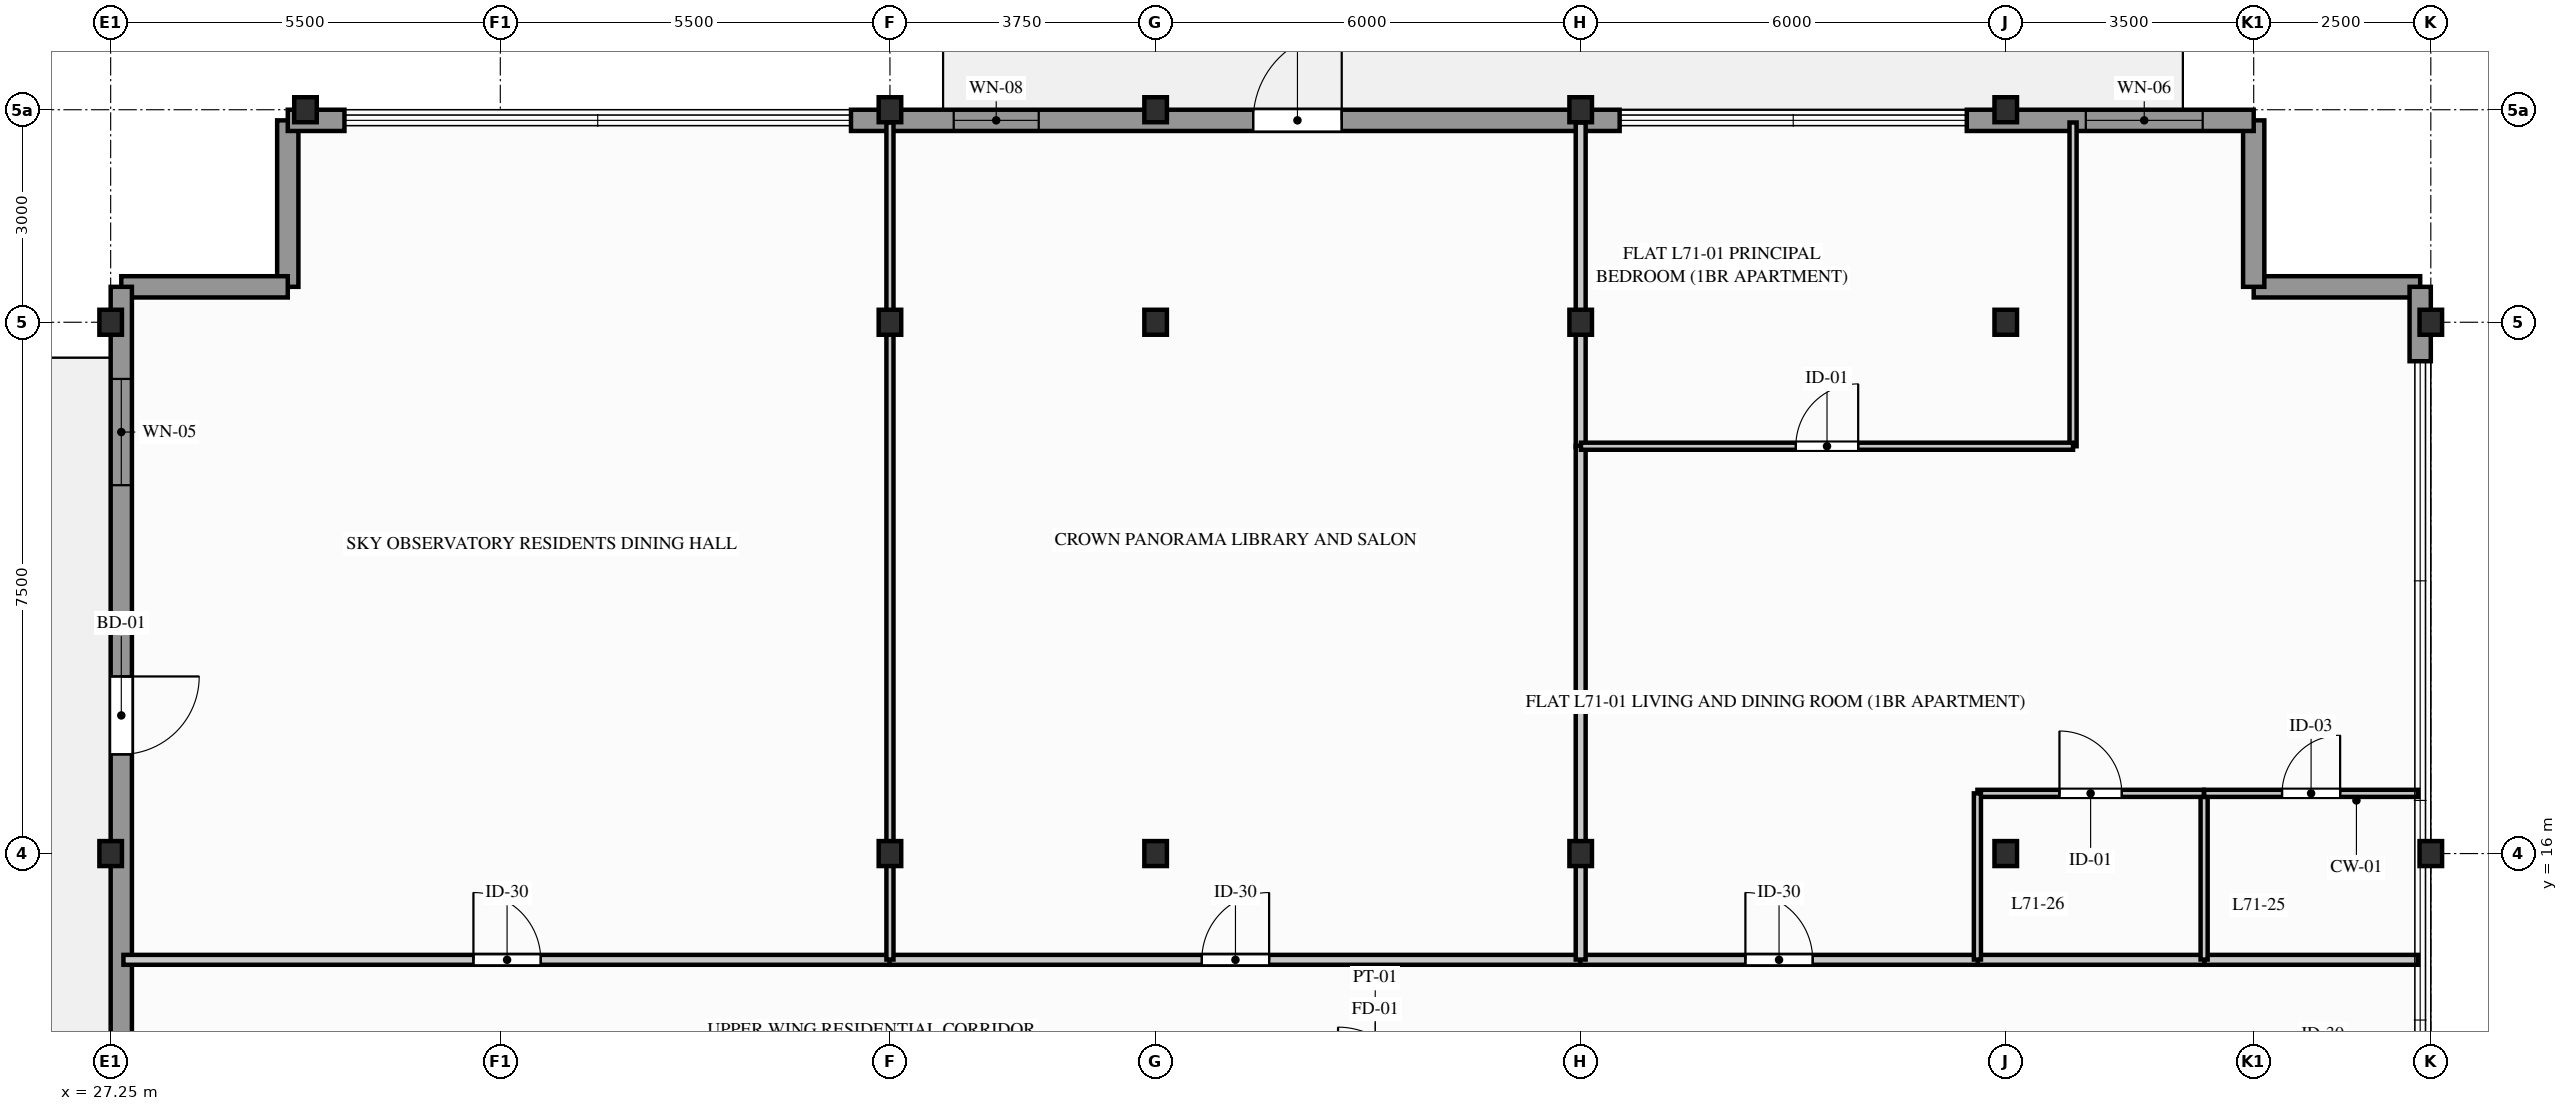
"""IFC4 building model, lengths in metres.
Left out: names, types, materials, properties, quantities, classifications, styles, units other than length and angle.
Written with IfcOpenShell. Run it as: python <this file> out.ifc"""

import sys

from ifc_helpers import new_model, si_unit, direction, frame, frame_2d, origin, origin_2d, place, context, subcontext, project, spatial, rectangle, i_section, extrude, element, fill, save


model = new_model("IFC4")
c1 = context("Model", 3, precision=1e-05, world=origin(), true_north=direction((0.0, 1.0)))
c2 = subcontext(c1, "Body", "Model", "MODEL_VIEW")
j1 = project(units=[si_unit("LENGTHUNIT", "METRE"), si_unit("PLANEANGLEUNIT", "RADIAN")], contexts=[c1])
p1 = place(None, origin())
s1 = spatial("IfcSite", under=j1, at=p1, CompositionType="ELEMENT")
p2 = place(p1, origin())
s2 = spatial("IfcBuilding", under=s1, at=p2, CompositionType="ELEMENT")
p3 = place(p2, frame((0.0, 0.0, 233.5)))
s3 = spatial("IfcBuildingStorey", under=s2, at=p3, CompositionType="ELEMENT", Elevation=233.5)
for number, where, z_axis, x_axis in (
    (1, (27.25, 16.0, 0.0), (0.0, 0.0, 1.0), (1.0, 0.0, 0.0)),
    (2, (27.25, 23.5, 0.0), (0.0, 0.0, 1.0), (1.0, 0.0, 0.0)),
    (3, (30.0, 26.5, 0.0), (0.0, 0.0, 1.0), (1.0, 0.0, 0.0)),
    (4, (38.25, 16.0, 0.0), (0.0, 0.0, 1.0), (1.0, 0.0, 0.0)),
    (5, (38.25, 23.5, 0.0), (0.0, 0.0, 1.0), (1.0, 0.0, 0.0)),
    (6, (38.25, 26.5, 0.0), (0.0, 0.0, 1.0), (1.0, 0.0, 0.0)),
    (7, (42.0, 16.0, 0.0), (0.0, 0.0, 1.0), (1.0, 0.0, 0.0)),
    (8, (42.0, 23.5, 0.0), (0.0, 0.0, 1.0), (1.0, 0.0, 0.0)),
    (9, (42.0, 26.5, 0.0), (0.0, 0.0, 1.0), (1.0, 0.0, 0.0)),
    (10, (48.0, 16.0, 0.0), (0.0, 0.0, 1.0), (1.0, 0.0, 0.0)),
    (11, (48.0, 23.5, 0.0), (0.0, 0.0, 1.0), (1.0, 0.0, 0.0)),
    (12, (48.0, 26.5, 0.0), (0.0, 0.0, 1.0), (1.0, 0.0, 0.0)),
    (13, (54.0, 16.0, 0.0), (0.0, 0.0, 1.0), (1.0, 0.0, 0.0)),
    (14, (54.0, 23.5, 0.0), (0.0, 0.0, 1.0), (1.0, 0.0, 0.0)),
    (15, (54.0, 26.5, 0.0), (0.0, 0.0, 1.0), (1.0, 0.0, 0.0)),
    (16, (60.0, 16.0, 0.0), (0.0, 0.0, 1.0), (1.0, 0.0, 0.0)),
    (17, (60.0, 23.5, 0.0), (0.0, 0.0, 1.0), (1.0, 0.0, 0.0)),
):
    element("IfcColumn", number, at=place(p3, frame(where, z_axis=z_axis, x_axis=x_axis)), inside=s3, PredefinedType="COLUMN", context=c2, shape_type="SweptSolid", body=[
        extrude(i_section(OverallWidth=0.318, OverallDepth=0.353, WebThickness=0.023, FlangeThickness=0.038, FilletRadius=0.015, at=origin_2d()), origin(), (0.0, 0.0, 1.0), 3.1),
    ])
for number, where, z_axis, x_axis in (
    (18, (59.85, 24.0, 0.0), (0.0, 0.0, 1.0), (-1.0, 0.0, 0.0)),
    (19, (57.5, 24.0, 0.0), (0.0, 0.0, 1.0), (0.0, 1.0, 0.0)),
    (20, (29.75, 26.35, 0.0), (0.0, 0.0, 1.0), (0.0, -1.0, 0.0)),
    (21, (29.75, 24.0, 0.0), (0.0, 0.0, 1.0), (-1.0, 0.0, 0.0)),
):
    element("IfcWall", number, at=place(p3, frame(where, z_axis=z_axis, x_axis=x_axis)), inside=s3, PredefinedType="STANDARD", context=c2, shape_type="SweptSolid", body=[
        extrude(rectangle(XDim=2.35, YDim=0.3, at=frame_2d((1.175, 0.0))), origin(), (0.0, 0.0, 1.0), 2.89),
    ])
p4 = place(p3, frame((59.85, 22.95, 0.0), z_axis=(0.0, 0.0, 1.0), x_axis=(0.0, 1.0, 0.0)))
e22 = element("IfcWall", 22, at=p4, inside=s3, PredefinedType="STANDARD", context=c2, shape_type="SweptSolid", body=[
    extrude(rectangle(XDim=1.05, YDim=0.3, at=frame_2d((0.525, 0.0))), origin(), (0.0, 0.0, 1.0), 2.89),
])
p5 = place(p3, frame((29.75, 26.35, 0.0), z_axis=(0.0, 0.0, 1.0), x_axis=(1.0, 0.0, 0.0)))
e23 = element("IfcWall", 23, at=p5, inside=s3, PredefinedType="STANDARD", context=c2, shape_type="SweptSolid", body=[
    extrude(rectangle(XDim=0.8, YDim=0.3, at=frame_2d((0.4, 0.0))), origin(), (0.0, 0.0, 1.0), 2.89),
])
p6 = place(p3, frame((37.7, 26.35, 0.0), z_axis=(0.0, 0.0, 1.0), x_axis=(1.0, 0.0, 0.0)))
e24 = element("IfcWall", 24, at=p6, inside=s3, PredefinedType="STANDARD", context=c2, shape_type="SweptSolid", body=[
    extrude(rectangle(XDim=10.85, YDim=0.3, at=frame_2d((5.425, 0.0))), origin(), (0.0, 0.0, 1.0), 2.332),
])
p7 = place(p6, frame((5.677, 0.0, 0.0)))
e25 = element("IfcOpeningElement", 25, at=p7, cuts=e24, PredefinedType="OPENING", context=c2, shape_type="SweptSolid", body=[
    extrude(rectangle(XDim=1.25, YDim=2.2, at=frame_2d((0.625, 1.1))), frame((0.0, 0.16, 0.0), z_axis=(0.0, -1.0, 0.0), x_axis=(1.0, 0.0, 0.0)), (0.0, 0.0, 1.0), 0.32),
])
p8 = place(p6, frame((1.45, 0.0, 0.512)))
e26 = element("IfcOpeningElement", 26, at=p8, cuts=e24, PredefinedType="OPENING", context=c2, shape_type="SweptSolid", body=[
    extrude(rectangle(XDim=1.2, YDim=1.6, at=frame_2d((0.6, 0.8))), frame((0.0, 0.16, 0.0), z_axis=(0.0, -1.0, 0.0), x_axis=(1.0, 0.0, 0.0)), (0.0, 0.0, 1.0), 0.32),
])
p9 = place(p3, frame((53.45, 26.35, 0.0), z_axis=(0.0, 0.0, 1.0), x_axis=(1.0, 0.0, 0.0)))
e27 = element("IfcWall", 27, at=p9, inside=s3, PredefinedType="STANDARD", context=c2, shape_type="SweptSolid", body=[
    extrude(rectangle(XDim=4.05, YDim=0.3, at=frame_2d((2.025, 0.0))), origin(), (0.0, 0.0, 1.0), 2.89),
])
p10 = place(p9, frame((1.68, 0.0, 0.77)))
e28 = element("IfcOpeningElement", 28, at=p10, cuts=e27, PredefinedType="OPENING", context=c2, shape_type="SweptSolid", body=[
    extrude(rectangle(XDim=1.65, YDim=1.9, at=frame_2d((0.825, 0.95))), frame((0.0, 0.16, 0.0), z_axis=(0.0, -1.0, 0.0), x_axis=(1.0, 0.0, 0.0)), (0.0, 0.0, 1.0), 0.32),
])
p11 = place(p3, frame((27.4, 24.0, 0.0), z_axis=(0.0, 0.0, 1.0), x_axis=(0.0, -1.0, 0.0)))
e29 = element("IfcWall", 29, at=p11, inside=s3, PredefinedType="STANDARD", context=c2, shape_type="SweptSolid", body=[
    extrude(rectangle(XDim=21.5, YDim=0.3, at=frame_2d((10.75, 0.0))), origin(), (0.0, 0.0, 1.0), 2.332),
])
p12 = place(p11, frame((5.5, 0.0, 0.0)))
e30 = element("IfcOpeningElement", 30, at=p12, cuts=e29, PredefinedType="OPENING", context=c2, shape_type="SweptSolid", body=[
    extrude(rectangle(XDim=1.1, YDim=2.2, at=frame_2d((0.55, 1.1))), frame((0.0, 0.16, 0.0), z_axis=(0.0, -1.0, 0.0), x_axis=(1.0, 0.0, 0.0)), (0.0, 0.0, 1.0), 0.32),
])
p13 = place(p11, frame((1.3, 0.0, 0.312)))
e31 = element("IfcOpeningElement", 31, at=p13, cuts=e29, PredefinedType="OPENING", context=c2, shape_type="SweptSolid", body=[
    extrude(rectangle(XDim=1.5, YDim=1.8, at=frame_2d((0.75, 0.9))), frame((0.0, 0.16, 0.0), z_axis=(0.0, -1.0, 0.0), x_axis=(1.0, 0.0, 0.0)), (0.0, 0.0, 1.0), 0.32),
])
p14 = place(p3, frame((27.43, 14.5, 0.0), z_axis=(0.0, 0.0, 1.0), x_axis=(1.0, 0.0, 0.0)))
e32 = element("IfcWall", 32, at=p14, inside=s3, PredefinedType="PARTITIONING", context=c2, shape_type="SweptSolid", body=[
    extrude(rectangle(XDim=10.831, YDim=0.14, at=frame_2d((5.416, 0.0))), origin(), (0.0, 0.0, 1.0), 2.325),
])
p15 = place(p14, frame((4.941, 0.0, 0.0)))
e33 = element("IfcOpeningElement", 33, at=p15, cuts=e32, PredefinedType="OPENING", context=c2, shape_type="SweptSolid", body=[
    extrude(rectangle(XDim=0.95, YDim=2.05, at=frame_2d((0.475, 1.025))), frame((0.0, 0.08, 0.0), z_axis=(0.0, -1.0, 0.0), x_axis=(1.0, 0.0, 0.0)), (0.0, 0.0, 1.0), 0.16),
])
p16 = place(p3, frame((38.243, 14.5, 0.0), z_axis=(0.0, 0.0, 1.0), x_axis=(1.0, 0.0, 0.0)))
e34 = element("IfcWall", 34, at=p16, inside=s3, PredefinedType="PARTITIONING", context=c2, shape_type="SweptSolid", body=[
    extrude(rectangle(XDim=9.769, YDim=0.14, at=frame_2d((4.884, 0.0))), origin(), (0.0, 0.0, 1.0), 2.325),
])
p17 = place(p16, frame((4.409, 0.0, 0.0)))
e35 = element("IfcOpeningElement", 35, at=p17, cuts=e34, PredefinedType="OPENING", context=c2, shape_type="SweptSolid", body=[
    extrude(rectangle(XDim=0.95, YDim=2.05, at=frame_2d((0.475, 1.025))), frame((0.0, 0.08, 0.0), z_axis=(0.0, -1.0, 0.0), x_axis=(1.0, 0.0, 0.0)), (0.0, 0.0, 1.0), 0.16),
])
p18 = place(p3, frame((56.789, 14.5, 0.0), z_axis=(0.0, 0.0, 1.0), x_axis=(1.0, 0.0, 0.0)))
e36 = element("IfcWall", 36, at=p18, inside=s3, PredefinedType="PARTITIONING", context=c2, shape_type="SweptSolid", body=[
    extrude(rectangle(XDim=3.031, YDim=0.14, at=frame_2d((1.516, 0.0))), origin(), (0.0, 0.0, 1.0), 2.89),
])
p19 = place(p3, frame((53.589, 14.5, 0.0), z_axis=(0.0, 0.0, 1.0), x_axis=(1.0, 0.0, 0.0)))
e37 = element("IfcWall", 37, at=p19, inside=s3, PredefinedType="PARTITIONING", context=c2, shape_type="SweptSolid", body=[
    extrude(rectangle(XDim=3.219, YDim=0.14, at=frame_2d((1.609, 0.0))), origin(), (0.0, 0.0, 1.0), 2.325),
])
p20 = place(p3, frame((47.993, 14.5, 0.0), z_axis=(0.0, 0.0, 1.0), x_axis=(1.0, 0.0, 0.0)))
e38 = element("IfcWall", 38, at=p20, inside=s3, PredefinedType="PARTITIONING", context=c2, shape_type="SweptSolid", body=[
    extrude(rectangle(XDim=5.615, YDim=0.14, at=frame_2d((2.807, 0.0))), origin(), (0.0, 0.0, 1.0), 2.325),
])
p21 = place(p20, frame((2.332, 0.0, 0.0)))
e39 = element("IfcOpeningElement", 39, at=p21, cuts=e38, PredefinedType="OPENING", context=c2, shape_type="SweptSolid", body=[
    extrude(rectangle(XDim=0.95, YDim=2.05, at=frame_2d((0.475, 1.025))), frame((0.0, 0.08, 0.0), z_axis=(0.0, -1.0, 0.0), x_axis=(1.0, 0.0, 0.0)), (0.0, 0.0, 1.0), 0.16),
])
p22 = place(p3, frame((38.25, 14.504, 0.0), z_axis=(0.0, 0.0, 1.0), x_axis=(0.0, 1.0, 0.0)))
e40 = element("IfcWall", 40, at=p22, inside=s3, PredefinedType="PARTITIONING", context=c2, shape_type="SweptSolid", body=[
    extrude(rectangle(XDim=11.816, YDim=0.1, at=frame_2d((5.908, 0.0))), origin(), (0.0, 0.0, 1.0), 2.325),
])
p23 = place(p3, frame((48.0, 21.739, 0.0), z_axis=(0.0, 0.0, 1.0), x_axis=(0.0, 1.0, 0.0)))
e41 = element("IfcWall", 41, at=p23, inside=s3, PredefinedType="PARTITIONING", context=c2, shape_type="SweptSolid", body=[
    extrude(rectangle(XDim=4.581, YDim=0.14, at=frame_2d((2.291, 0.0))), origin(), (0.0, 0.0, 1.0), 2.325),
])
p24 = place(p3, frame((48.0, 14.504, 0.0), z_axis=(0.0, 0.0, 1.0), x_axis=(0.0, 1.0, 0.0)))
e42 = element("IfcWall", 42, at=p24, inside=s3, PredefinedType="PARTITIONING", context=c2, shape_type="SweptSolid", body=[
    extrude(rectangle(XDim=7.253, YDim=0.14, at=frame_2d((3.627, 0.0))), origin(), (0.0, 0.0, 1.0), 2.325),
])
p25 = place(p3, frame((56.8, 14.504, 0.0), z_axis=(0.0, 0.0, 1.0), x_axis=(0.0, 1.0, 0.0)))
e43 = element("IfcWall", 43, at=p25, inside=s3, PredefinedType="PARTITIONING", context=c2, shape_type="SweptSolid", body=[
    extrude(rectangle(XDim=2.346, YDim=0.1, at=frame_2d((1.173, 0.0))), origin(), (0.0, 0.0, 1.0), 2.325),
])
p26 = place(p3, frame((56.8, 16.85, 0.0), z_axis=(0.0, 0.0, 1.0), x_axis=(1.0, 0.0, 0.0)))
e44 = element("IfcWall", 44, at=p26, inside=s3, PredefinedType="PARTITIONING", context=c2, shape_type="SweptSolid", body=[
    extrude(rectangle(XDim=3.02, YDim=0.1, at=frame_2d((1.51, 0.0))), origin(), (0.0, 0.0, 1.0), 2.89),
])
p27 = place(p26, frame((1.1, 0.0, 0.0)))
e45 = element("IfcOpeningElement", 45, at=p27, cuts=e44, PredefinedType="OPENING", context=c2, shape_type="SweptSolid", body=[
    extrude(rectangle(XDim=0.82, YDim=2.02, at=frame_2d((0.41, 1.01))), frame((0.0, 0.06, 0.0), z_axis=(0.0, -1.0, 0.0), x_axis=(1.0, 0.0, 0.0)), (0.0, 0.0, 1.0), 0.12),
])
p28 = place(p3, frame((53.6, 16.85, 0.0), z_axis=(0.0, 0.0, 1.0), x_axis=(1.0, 0.0, 0.0)))
e46 = element("IfcWall", 46, at=p28, inside=s3, PredefinedType="PARTITIONING", context=c2, shape_type="SweptSolid", body=[
    extrude(rectangle(XDim=3.196, YDim=0.1, at=frame_2d((1.598, 0.0))), origin(), (0.0, 0.0, 1.0), 2.325),
])
p29 = place(p28, frame((1.158, 0.0, 0.0)))
e47 = element("IfcOpeningElement", 47, at=p29, cuts=e46, PredefinedType="OPENING", context=c2, shape_type="SweptSolid", body=[
    extrude(rectangle(XDim=0.88, YDim=2.04, at=frame_2d((0.44, 1.02))), frame((0.0, 0.06, 0.0), z_axis=(0.0, -1.0, 0.0), x_axis=(1.0, 0.0, 0.0)), (0.0, 0.0, 1.0), 0.12),
])
p30 = place(p3, frame((53.6, 14.504, 0.0), z_axis=(0.0, 0.0, 1.0), x_axis=(0.0, 1.0, 0.0)))
e48 = element("IfcWall", 48, at=p30, inside=s3, PredefinedType="PARTITIONING", context=c2, shape_type="SweptSolid", body=[
    extrude(rectangle(XDim=2.346, YDim=0.1, at=frame_2d((1.173, 0.0))), origin(), (0.0, 0.0, 1.0), 2.325),
])
p31 = place(p3, frame((54.95, 21.75, 0.0), z_axis=(0.0, 0.0, 1.0), x_axis=(0.0, 1.0, 0.0)))
e49 = element("IfcWall", 49, at=p31, inside=s3, PredefinedType="PARTITIONING", context=c2, shape_type="SweptSolid", body=[
    extrude(rectangle(XDim=4.57, YDim=0.1, at=frame_2d((2.285, 0.0))), origin(), (0.0, 0.0, 1.0), 2.325),
])
p32 = place(p3, frame((48.004, 21.75, 0.0), z_axis=(0.0, 0.0, 1.0), x_axis=(1.0, 0.0, 0.0)))
e50 = element("IfcWall", 50, at=p32, inside=s3, PredefinedType="PARTITIONING", context=c2, shape_type="SweptSolid", body=[
    extrude(rectangle(XDim=6.946, YDim=0.1, at=frame_2d((3.473, 0.0))), origin(), (0.0, 0.0, 1.0), 2.325),
])
p33 = place(p32, frame((3.033, 0.0, 0.0)))
e51 = element("IfcOpeningElement", 51, at=p33, cuts=e50, PredefinedType="OPENING", context=c2, shape_type="SweptSolid", body=[
    extrude(rectangle(XDim=0.88, YDim=2.04, at=frame_2d((0.44, 1.02))), frame((0.0, 0.06, 0.0), z_axis=(0.0, -1.0, 0.0), x_axis=(1.0, 0.0, 0.0)), (0.0, 0.0, 1.0), 0.12),
])
p34 = place(p7, origin())
e52 = element("IfcDoor", 52, at=p34, inside=s3, OperationType="SINGLE_SWING_RIGHT", PredefinedType="DOOR", context=c2, shape_type="SweptSolid", body=[
    extrude(rectangle(XDim=1.25, YDim=2.2, at=frame_2d((0.625, 1.1))), frame((0.0, 0.025, 0.0), z_axis=(0.0, -1.0, 0.0), x_axis=(1.0, 0.0, 0.0)), (0.0, 0.0, 1.0), 0.05),
])
fill(e25, e52)
p35 = place(p8, origin())
e53 = element("IfcWindow", 53, at=p35, inside=s3, PartitioningType="SINGLE_PANEL", PredefinedType="WINDOW", context=c2, shape_type="SweptSolid", body=[
    extrude(rectangle(XDim=1.2, YDim=1.6, at=frame_2d((0.6, 0.8))), frame((0.0, 0.03, 0.0), z_axis=(0.0, -1.0, 0.0), x_axis=(1.0, 0.0, 0.0)), (0.0, 0.0, 1.0), 0.06),
])
fill(e26, e53)
p36 = place(p10, origin())
e54 = element("IfcWindow", 54, at=p36, inside=s3, PartitioningType="SINGLE_PANEL", PredefinedType="WINDOW", context=c2, shape_type="SweptSolid", body=[
    extrude(rectangle(XDim=1.65, YDim=1.9, at=frame_2d((0.825, 0.95))), frame((0.0, 0.03, 0.0), z_axis=(0.0, -1.0, 0.0), x_axis=(1.0, 0.0, 0.0)), (0.0, 0.0, 1.0), 0.06),
])
fill(e28, e54)
p37 = place(p12, origin())
e55 = element("IfcDoor", 55, at=p37, inside=s3, OperationType="SINGLE_SWING_LEFT", PredefinedType="DOOR", context=c2, shape_type="SweptSolid", body=[
    extrude(rectangle(XDim=1.1, YDim=2.2, at=frame_2d((0.55, 1.1))), frame((0.0, 0.025, 0.0), z_axis=(0.0, -1.0, 0.0), x_axis=(1.0, 0.0, 0.0)), (0.0, 0.0, 1.0), 0.05),
])
fill(e30, e55)
p38 = place(p13, origin())
e56 = element("IfcWindow", 56, at=p38, inside=s3, PartitioningType="SINGLE_PANEL", PredefinedType="WINDOW", context=c2, shape_type="SweptSolid", body=[
    extrude(rectangle(XDim=1.5, YDim=1.8, at=frame_2d((0.75, 0.9))), frame((0.0, 0.03, 0.0), z_axis=(0.0, -1.0, 0.0), x_axis=(1.0, 0.0, 0.0)), (0.0, 0.0, 1.0), 0.06),
])
fill(e31, e56)
p39 = place(p15, origin())
e57 = element("IfcDoor", 57, at=p39, inside=s3, OperationType="SINGLE_SWING_LEFT", PredefinedType="DOOR", context=c2, shape_type="SweptSolid", body=[
    extrude(rectangle(XDim=0.95, YDim=2.05, at=frame_2d((0.475, 1.025))), frame((0.0, 0.025, 0.0), z_axis=(0.0, -1.0, 0.0), x_axis=(1.0, 0.0, 0.0)), (0.0, 0.0, 1.0), 0.05),
])
fill(e33, e57)
p40 = place(p17, origin())
e58 = element("IfcDoor", 58, at=p40, inside=s3, OperationType="SINGLE_SWING_RIGHT", PredefinedType="DOOR", context=c2, shape_type="SweptSolid", body=[
    extrude(rectangle(XDim=0.95, YDim=2.05, at=frame_2d((0.475, 1.025))), frame((0.0, 0.025, 0.0), z_axis=(0.0, -1.0, 0.0), x_axis=(1.0, 0.0, 0.0)), (0.0, 0.0, 1.0), 0.05),
])
fill(e35, e58)
p41 = place(p21, origin())
e59 = element("IfcDoor", 59, at=p41, inside=s3, OperationType="SINGLE_SWING_LEFT", PredefinedType="DOOR", context=c2, shape_type="SweptSolid", body=[
    extrude(rectangle(XDim=0.95, YDim=2.05, at=frame_2d((0.475, 1.025))), frame((0.0, 0.025, 0.0), z_axis=(0.0, -1.0, 0.0), x_axis=(1.0, 0.0, 0.0)), (0.0, 0.0, 1.0), 0.05),
])
fill(e39, e59)
p42 = place(p27, origin())
e60 = element("IfcDoor", 60, at=p42, inside=s3, OperationType="SINGLE_SWING_RIGHT", PredefinedType="DOOR", context=c2, shape_type="SweptSolid", body=[
    extrude(rectangle(XDim=0.82, YDim=2.02, at=frame_2d((0.41, 1.01))), frame((0.0, 0.025, 0.0), z_axis=(0.0, -1.0, 0.0), x_axis=(1.0, 0.0, 0.0)), (0.0, 0.0, 1.0), 0.05),
])
fill(e45, e60)
p43 = place(p29, origin())
e61 = element("IfcDoor", 61, at=p43, inside=s3, OperationType="SINGLE_SWING_LEFT", PredefinedType="DOOR", context=c2, shape_type="SweptSolid", body=[
    extrude(rectangle(XDim=0.88, YDim=2.04, at=frame_2d((0.44, 1.02))), frame((0.0, 0.025, 0.0), z_axis=(0.0, -1.0, 0.0), x_axis=(1.0, 0.0, 0.0)), (0.0, 0.0, 1.0), 0.05),
])
fill(e47, e61)
p44 = place(p33, origin())
e62 = element("IfcDoor", 62, at=p44, inside=s3, OperationType="SINGLE_SWING_RIGHT", PredefinedType="DOOR", context=c2, shape_type="SweptSolid", body=[
    extrude(rectangle(XDim=0.88, YDim=2.04, at=frame_2d((0.44, 1.02))), frame((0.0, 0.025, 0.0), z_axis=(0.0, -1.0, 0.0), x_axis=(1.0, 0.0, 0.0)), (0.0, 0.0, 1.0), 0.05),
])
fill(e51, e62)
save(model, sys.argv[1])
